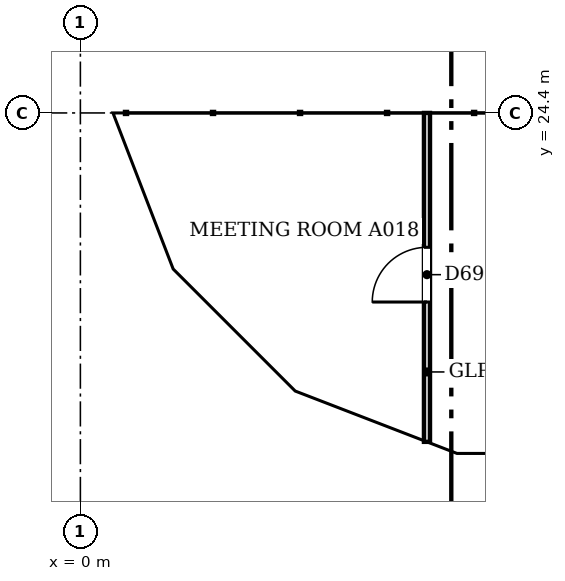
"""IFC4 building model, lengths in metres.
Left out: names, types, materials, properties, quantities, classifications, styles, units other than length and angle.
Written with IfcOpenShell. Run it as: python <this file> out.ifc"""

import sys

from ifc_helpers import new_model, si_unit, direction, frame, frame_2d, origin, place, context, subcontext, project, spatial, polyline, rectangle, outline, extrude, faceted_brep, source, transform, mapped, element, fill, save


model = new_model("IFC4")
c1 = context("Model", 3, precision=1e-05, world=origin(), true_north=direction((0.0, 1.0)))
c2 = subcontext(c1, "Body", "Model", "MODEL_VIEW")
j1 = project(units=[si_unit("LENGTHUNIT", "METRE"), si_unit("PLANEANGLEUNIT", "RADIAN")], contexts=[c1])
p1 = place(None, origin())
s1 = spatial("IfcSite", under=j1, at=p1, CompositionType="ELEMENT")
p2 = place(p1, origin())
s2 = spatial("IfcBuilding", under=s1, at=p2, CompositionType="ELEMENT")
p3 = place(p2, frame((0.0, 0.0, 120.2)))
s3 = spatial("IfcBuildingStorey", under=s2, at=p3, CompositionType="ELEMENT", Elevation=120.2)
m1 = source(origin(), c2, "Body", "Brep", [
    faceted_brep([(3.05, -0.25, 0.0), (6.053, -0.25, 3.8), (3.05, -0.25, 7.6), (0.0, -0.25, 3.8), (0.0, 0.25, 3.8), (3.05, 0.25, 7.6), (6.007, 0.25, 3.859), (6.007, 0.25, 3.741), (3.05, 0.25, 0.0), (6.053, 0.0, 3.8)], [[[0, 1, 2, 3]], [[4, 5, 6, 7, 8]], [[8, 7, 9, 1, 0]], [[6, 5, 2, 1, 9]], [[5, 4, 3, 2]], [[4, 8, 0, 3]], [[9, 7, 6]]]),
])
p4 = place(p3, frame((0.25, 30.5, -3.8), z_axis=(0.0, 0.0, 1.0), x_axis=(0.0, -1.0, 0.0)))
e1 = element("IfcWall", 1, at=p4, inside=s3, PredefinedType="SOLIDWALL", context=c2, shape_type="MappedRepresentation", body=[
    mapped(m1, transform((0.0, 0.0, 0.0), scale=1.0)),
])
m2 = source(origin(), c2, "Body", "SweptSolid", [
    extrude(outline(polyline([(3.049, 0.401), (5.735, 3.8), (3.049, 7.199), (0.321, 3.8), (3.049, 0.401)])), frame((0.0, 0.26, 0.0), z_axis=(0.0, -1.0, 0.0), x_axis=(1.0, 0.0, 0.0)), (0.0, 0.0, 1.0), 0.52),
])
p5 = place(p4, origin())
e2 = element("IfcOpeningElement", 2, at=p5, cuts=e1, PredefinedType="OPENING", context=c2, shape_type="MappedRepresentation", body=[
    mapped(m2, transform((0.0, 0.0, 0.0), scale=1.0)),
])
m3 = source(origin(), c2, "Body", "Brep", [
    faceted_brep([(2.95, -0.25, 0.0), (3.003, -0.25, 0.068), (3.003, -0.25, 7.532), (2.95, -0.25, 7.6), (0.0, -0.25, 3.8), (0.047, 0.25, 3.86), (2.898, 0.25, 7.532), (2.898, 0.25, 0.068), (0.047, 0.25, 3.74), (2.95, 0.0, 0.0), (2.95, 0.0, 7.6), (0.0, 0.0, 3.8)], [[[0, 1, 2, 3, 4]], [[5, 6, 7, 8]], [[1, 0, 9]], [[10, 3, 2]], [[6, 5, 11, 4, 3, 10]], [[8, 7, 9, 0, 4, 11]], [[8, 11, 5]], [[1, 9, 7, 6, 10, 2]]]),
])
p6 = place(p3, frame((0.25, 24.447, -3.8), z_axis=(0.0, 0.0, 1.0), x_axis=(0.35992665181, -0.932980602862, 0.0)))
e3 = element("IfcWall", 3, at=p6, inside=s3, PredefinedType="SOLIDWALL", context=c2, shape_type="MappedRepresentation", body=[
    mapped(m3, transform((0.0, 0.0, 0.0), scale=1.0)),
])
m4 = source(origin(), c2, "Body", "SweptSolid", [
    extrude(outline(polyline([(2.75, 6.935), (0.316, 3.8), (2.75, 0.665), (2.75, 6.935)])), frame((0.0, 0.26, 0.0), z_axis=(0.0, -1.0, 0.0), x_axis=(1.0, 0.0, 0.0)), (0.0, 0.0, 1.0), 0.52),
])
p7 = place(p6, origin())
e4 = element("IfcOpeningElement", 4, at=p7, cuts=e3, PredefinedType="OPENING", context=c2, shape_type="MappedRepresentation", body=[
    mapped(m4, transform((0.0, 0.0, 0.0), scale=1.0)),
])
m5 = source(origin(), c2, "Body", "Brep", [
    faceted_brep([(0.053, -0.25, 0.0), (2.997, -0.25, 3.8), (0.053, -0.25, 7.6), (0.0, -0.25, 7.532), (0.0, -0.25, 0.068), (0.106, 0.25, 7.532), (2.944, 0.25, 3.868), (2.944, 0.25, 3.732), (0.106, 0.25, 0.068), (2.997, 0.0, 3.8), (0.053, 0.0, 0.0), (0.053, 0.0, 7.6)], [[[0, 1, 2, 3, 4]], [[5, 6, 7, 8]], [[8, 7, 9, 1, 0, 10]], [[6, 5, 11, 2, 1, 9]], [[3, 2, 11]], [[10, 0, 4]], [[8, 10, 4, 3, 11, 5]], [[9, 7, 6]]]),
])
p8 = place(p3, frame((1.274, 21.731, -3.8), z_axis=(0.0, 0.0, 1.0), x_axis=(0.707147509625, -0.707066050402, 0.0)))
e5 = element("IfcWall", 5, at=p8, inside=s3, PredefinedType="SOLIDWALL", context=c2, shape_type="MappedRepresentation", body=[
    mapped(m5, transform((0.0, 0.0, 0.0), scale=1.0)),
])
m6 = source(origin(), c2, "Body", "SweptSolid", [
    extrude(outline(polyline([(0.253, 0.667), (2.681, 3.8), (0.253, 6.934), (0.253, 0.667)])), frame((0.0, 0.26, 0.0), z_axis=(0.0, -1.0, 0.0), x_axis=(1.0, 0.0, 0.0)), (0.0, 0.0, 1.0), 0.52),
])
p9 = place(p8, origin())
e6 = element("IfcOpeningElement", 6, at=p9, cuts=e5, PredefinedType="OPENING", context=c2, shape_type="MappedRepresentation", body=[
    mapped(m6, transform((0.0, 0.0, 0.0), scale=1.0)),
])
m7 = source(origin(), c2, "Body", "Brep", [
    faceted_brep([(2.95, -0.25, 0.0), (2.997, -0.25, 0.059), (2.997, -0.25, 7.541), (2.95, -0.25, 7.6), (0.0, -0.25, 3.8), (0.053, 0.25, 3.868), (2.904, 0.25, 7.54), (2.904, 0.25, 0.06), (0.053, 0.25, 3.732), (2.95, 0.0, 0.0), (2.95, 0.0, 7.6), (0.0, 0.0, 3.8)], [[[0, 1, 2, 3, 4]], [[5, 6, 7, 8]], [[1, 0, 9]], [[10, 3, 2]], [[6, 5, 11, 4, 3, 10]], [[8, 7, 9, 0, 4, 11]], [[8, 11, 5]], [[1, 9, 7, 6, 10, 2]]]),
])
p10 = place(p3, frame((3.394, 19.612, -3.8), z_axis=(0.0, 0.0, 1.0), x_axis=(0.932990326376, -0.359901446078, 0.0)))
e7 = element("IfcWall", 7, at=p10, inside=s3, PredefinedType="SOLIDWALL", context=c2, shape_type="MappedRepresentation", body=[
    mapped(m7, transform((0.0, 0.0, 0.0), scale=1.0)),
])
p11 = place(p10, origin())
e8 = element("IfcOpeningElement", 8, at=p11, cuts=e7, PredefinedType="OPENING", context=c2, shape_type="MappedRepresentation", body=[
    mapped(m4, transform((0.0, 0.0, 0.0), scale=1.0)),
])
m8 = source(origin(), c2, "Body", "Brep", [
    faceted_brep([(0.047, -0.25, 0.0), (3.05, -0.25, 3.8), (0.047, -0.25, 7.6), (0.0, -0.25, 7.54), (0.0, -0.25, 0.06), (0.093, 0.25, 7.541), (3.05, 0.25, 3.8), (0.093, 0.25, 0.059), (0.047, 0.0, 0.0), (0.047, 0.0, 7.6)], [[[0, 1, 2, 3, 4]], [[5, 6, 7]], [[7, 6, 1, 0, 8]], [[6, 5, 9, 2, 1]], [[3, 2, 9]], [[8, 0, 4]], [[7, 8, 4, 3, 9, 5]]]),
])
p12 = place(p3, frame((6.1, 18.55, -3.8), z_axis=(0.0, 0.0, 1.0), x_axis=(1.0, 0.0, 0.0)))
e9 = element("IfcWall", 9, at=p12, inside=s3, PredefinedType="SOLIDWALL", context=c2, shape_type="MappedRepresentation", body=[
    mapped(m8, transform((0.0, 0.0, 0.0), scale=1.0)),
])
m9 = source(origin(), c2, "Body", "SweptSolid", [
    extrude(outline(polyline([(0.247, 0.656), (2.731, 3.8), (0.247, 6.944), (0.247, 0.656)])), frame((0.0, 0.26, 0.0), z_axis=(0.0, -1.0, 0.0), x_axis=(1.0, 0.0, 0.0)), (0.0, 0.0, 1.0), 0.52),
])
p13 = place(p12, origin())
e10 = element("IfcOpeningElement", 10, at=p13, cuts=e9, PredefinedType="OPENING", context=c2, shape_type="MappedRepresentation", body=[
    mapped(m9, transform((0.0, 0.0, 0.0), scale=1.0)),
])
p14 = place(p2, frame((0.0, 0.0, 124.0)))
s4 = spatial("IfcBuildingStorey", under=s2, at=p14, CompositionType="ELEMENT", Elevation=124.0)
m10 = source(origin(), c2, "Body", "Brep", [
    faceted_brep([(3.003, -0.25, 0.0), (3.05, -0.25, 0.06), (3.05, -0.25, 7.54), (3.003, -0.25, 7.6), (0.0, -0.25, 3.8), (0.0, 0.25, 3.8), (2.957, 0.25, 7.541), (2.957, 0.25, 0.059), (3.003, 0.0, 0.0), (3.003, 0.0, 7.6)], [[[0, 1, 2, 3, 4]], [[5, 6, 7]], [[1, 0, 8]], [[9, 3, 2]], [[6, 5, 4, 3, 9]], [[5, 7, 8, 0, 4]], [[1, 8, 7, 6, 9, 2]]]),
])
p15 = place(p14, frame((0.25, 27.45, -3.8), z_axis=(0.0, 0.0, 1.0), x_axis=(0.0, -1.0, 0.0)))
e11 = element("IfcWall", 11, at=p15, inside=s4, PredefinedType="SOLIDWALL", context=c2, shape_type="MappedRepresentation", body=[
    mapped(m10, transform((0.0, 0.0, 0.0), scale=1.0)),
])
m11 = source(origin(), c2, "Body", "SweptSolid", [
    extrude(outline(polyline([(2.803, 6.944), (0.319, 3.8), (2.803, 0.656), (2.803, 6.944)])), frame((0.0, 0.26, 0.0), z_axis=(0.0, -1.0, 0.0), x_axis=(1.0, 0.0, 0.0)), (0.0, 0.0, 1.0), 0.52),
])
p16 = place(p15, origin())
e12 = element("IfcOpeningElement", 12, at=p16, cuts=e11, PredefinedType="OPENING", context=c2, shape_type="MappedRepresentation", body=[
    mapped(m11, transform((0.0, 0.0, 0.0), scale=1.0)),
])
m12 = source(origin(), c2, "Body", "Brep", [
    faceted_brep([(0.047, -0.25, 0.0), (2.997, -0.25, 3.8), (0.047, -0.25, 7.6), (0.0, -0.25, 7.541), (0.0, -0.25, 0.059), (0.093, 0.25, 7.54), (2.944, 0.25, 3.868), (2.944, 0.25, 3.732), (0.093, 0.25, 0.06), (2.997, 0.0, 3.8), (0.047, 0.0, 0.0), (0.047, 0.0, 7.6)], [[[0, 1, 2, 3, 4]], [[5, 6, 7, 8]], [[8, 7, 9, 1, 0, 10]], [[6, 5, 11, 2, 1, 9]], [[3, 2, 11]], [[10, 0, 4]], [[8, 10, 4, 3, 11, 5]], [[9, 7, 6]]]),
])
p17 = place(p14, frame((0.233, 24.49, -3.8), z_axis=(0.0, 0.0, 1.0), x_axis=(0.359901446078, -0.932990326376, 0.0)))
e13 = element("IfcWall", 13, at=p17, inside=s4, PredefinedType="SOLIDWALL", context=c2, shape_type="MappedRepresentation", body=[
    mapped(m12, transform((0.0, 0.0, 0.0), scale=1.0)),
])
m13 = source(origin(), c2, "Body", "SweptSolid", [
    extrude(outline(polyline([(0.247, 0.665), (2.681, 3.8), (0.247, 6.935), (0.247, 0.665)])), frame((0.0, 0.26, 0.0), z_axis=(0.0, -1.0, 0.0), x_axis=(1.0, 0.0, 0.0)), (0.0, 0.0, 1.0), 0.52),
])
p18 = place(p17, origin())
e14 = element("IfcOpeningElement", 14, at=p18, cuts=e13, PredefinedType="OPENING", context=c2, shape_type="MappedRepresentation", body=[
    mapped(m13, transform((0.0, 0.0, 0.0), scale=1.0)),
])
m14 = source(origin(), c2, "Body", "Brep", [
    faceted_brep([(2.944, -0.25, 0.0), (2.997, -0.25, 0.068), (2.997, -0.25, 7.532), (2.944, -0.25, 7.6), (0.0, -0.25, 3.8), (0.053, 0.25, 3.868), (2.891, 0.25, 7.532), (2.891, 0.25, 0.068), (0.053, 0.25, 3.732), (2.944, 0.0, 0.0), (2.944, 0.0, 7.6), (0.0, 0.0, 3.8)], [[[0, 1, 2, 3, 4]], [[5, 6, 7, 8]], [[1, 0, 9]], [[10, 3, 2]], [[6, 5, 11, 4, 3, 10]], [[8, 7, 9, 0, 4, 11]], [[8, 11, 5]], [[1, 9, 7, 6, 10, 2]]]),
])
p19 = place(p14, frame((1.312, 21.694, -3.8), z_axis=(0.0, 0.0, 1.0), x_axis=(0.707066050402, -0.707147509625, 0.0)))
e15 = element("IfcWall", 15, at=p19, inside=s4, PredefinedType="SOLIDWALL", context=c2, shape_type="MappedRepresentation", body=[
    mapped(m14, transform((0.0, 0.0, 0.0), scale=1.0)),
])
m15 = source(origin(), c2, "Body", "SweptSolid", [
    extrude(outline(polyline([(2.744, 6.934), (0.316, 3.8), (2.744, 0.666), (2.744, 6.934)])), frame((0.0, 0.26, 0.0), z_axis=(0.0, -1.0, 0.0), x_axis=(1.0, 0.0, 0.0)), (0.0, 0.0, 1.0), 0.52),
])
p20 = place(p19, origin())
e16 = element("IfcOpeningElement", 16, at=p20, cuts=e15, PredefinedType="OPENING", context=c2, shape_type="MappedRepresentation", body=[
    mapped(m15, transform((0.0, 0.0, 0.0), scale=1.0)),
])
m16 = source(origin(), c2, "Body", "Brep", [
    faceted_brep([(0.053, -0.25, 0.0), (3.003, -0.25, 3.8), (0.053, -0.25, 7.6), (0.0, -0.25, 7.532), (0.0, -0.25, 0.068), (0.106, 0.25, 7.532), (2.957, 0.25, 3.86), (2.957, 0.25, 3.74), (0.106, 0.25, 0.068), (3.003, 0.0, 3.8), (0.053, 0.0, 0.0), (0.053, 0.0, 7.6)], [[[0, 1, 2, 3, 4]], [[5, 6, 7, 8]], [[8, 7, 9, 1, 0, 10]], [[6, 5, 11, 2, 1, 9]], [[3, 2, 11]], [[10, 0, 4]], [[8, 10, 4, 3, 11, 5]], [[9, 7, 6]]]),
])
p21 = place(p14, frame((3.344, 19.631, -3.8), z_axis=(0.0, 0.0, 1.0), x_axis=(0.933007896601, -0.359855894603, 0.0)))
e17 = element("IfcWall", 17, at=p21, inside=s4, PredefinedType="SOLIDWALL", context=c2, shape_type="MappedRepresentation", body=[
    mapped(m16, transform((0.0, 0.0, 0.0), scale=1.0)),
])
m17 = source(origin(), c2, "Body", "SweptSolid", [
    extrude(outline(polyline([(0.253, 0.665), (2.687, 3.8), (0.253, 6.935), (0.253, 0.665)])), frame((0.0, 0.26, 0.0), z_axis=(0.0, -1.0, 0.0), x_axis=(1.0, 0.0, 0.0)), (0.0, 0.0, 1.0), 0.52),
])
p22 = place(p21, origin())
e18 = element("IfcOpeningElement", 18, at=p22, cuts=e17, PredefinedType="OPENING", context=c2, shape_type="MappedRepresentation", body=[
    mapped(m17, transform((0.0, 0.0, 0.0), scale=1.0)),
])
m18 = source(origin(), c2, "Body", "Brep", [
    faceted_brep([(3.003, -0.25, 0.0), (6.053, -0.25, 3.8), (3.003, -0.25, 7.6), (0.0, -0.25, 3.8), (0.047, 0.25, 3.859), (3.003, 0.25, 7.6), (6.053, 0.25, 3.8), (3.003, 0.25, 0.0), (0.047, 0.25, 3.741), (0.0, 0.0, 3.8)], [[[0, 1, 2, 3]], [[4, 5, 6, 7, 8]], [[7, 6, 1, 0]], [[6, 5, 2, 1]], [[5, 4, 9, 3, 2]], [[8, 7, 0, 3, 9]], [[8, 9, 4]]]),
])
p23 = place(p14, frame((6.146, 18.55, -3.8), z_axis=(0.0, 0.0, 1.0), x_axis=(1.0, 0.0, 0.0)))
e19 = element("IfcWall", 19, at=p23, inside=s4, PredefinedType="SOLIDWALL", context=c2, shape_type="MappedRepresentation", body=[
    mapped(m18, transform((0.0, 0.0, 0.0), scale=1.0)),
])
m19 = source(origin(), c2, "Body", "SweptSolid", [
    extrude(outline(polyline([(3.005, 0.401), (5.733, 3.8), (3.005, 7.199), (0.319, 3.8), (3.005, 0.401)])), frame((0.0, 0.26, 0.0), z_axis=(0.0, -1.0, 0.0), x_axis=(1.0, 0.0, 0.0)), (0.0, 0.0, 1.0), 0.52),
])
p24 = place(p23, origin())
e20 = element("IfcOpeningElement", 20, at=p24, cuts=e19, PredefinedType="OPENING", context=c2, shape_type="MappedRepresentation", body=[
    mapped(m19, transform((0.0, 0.0, 0.0), scale=1.0)),
])
p25 = place(p3, frame((5.7, 18.99, 0.0), z_axis=(0.0, 0.0, 1.0), x_axis=(0.0, 1.0, 0.0)))
e21 = element("IfcWall", 21, at=p25, inside=s3, PredefinedType="PARTITIONING", context=c2, shape_type="SweptSolid", body=[
    extrude(rectangle(XDim=5.41, YDim=0.1, at=frame_2d((2.705, 0.0))), origin(), (0.0, 0.0, 1.0), 3.067),
])
m20 = source(origin(), c2, "Body", "SweptSolid", [
    extrude(rectangle(XDim=0.9, YDim=2.1, at=frame_2d((0.45, 1.05))), frame((0.0, 0.06, 0.0), z_axis=(0.0, -1.0, 0.0), x_axis=(1.0, 0.0, 0.0)), (0.0, 0.0, 1.0), 0.12),
])
p26 = place(p25, frame((2.3, 0.0, 0.0)))
e22 = element("IfcOpeningElement", 22, at=p26, cuts=e21, PredefinedType="OPENING", context=c2, shape_type="MappedRepresentation", body=[
    mapped(m20, transform((0.0, 0.0, 0.0), scale=1.0)),
])
m21 = source(origin(), c2, "Body", "SweptSolid", [
    extrude(rectangle(XDim=0.9, YDim=2.1, at=frame_2d((0.45, 1.05))), frame((0.0, 0.025, 0.0), z_axis=(0.0, -1.0, 0.0), x_axis=(1.0, 0.0, 0.0)), (0.0, 0.0, 1.0), 0.05),
])
p27 = place(p26, origin())
e23 = element("IfcDoor", 23, at=p27, inside=s3, OperationType="SINGLE_SWING_LEFT", PredefinedType="DOOR", context=c2, shape_type="MappedRepresentation", body=[
    mapped(m21, transform((0.0, 0.0, 0.0), scale=1.0)),
])
fill(e22, e23)
save(model, sys.argv[1])
